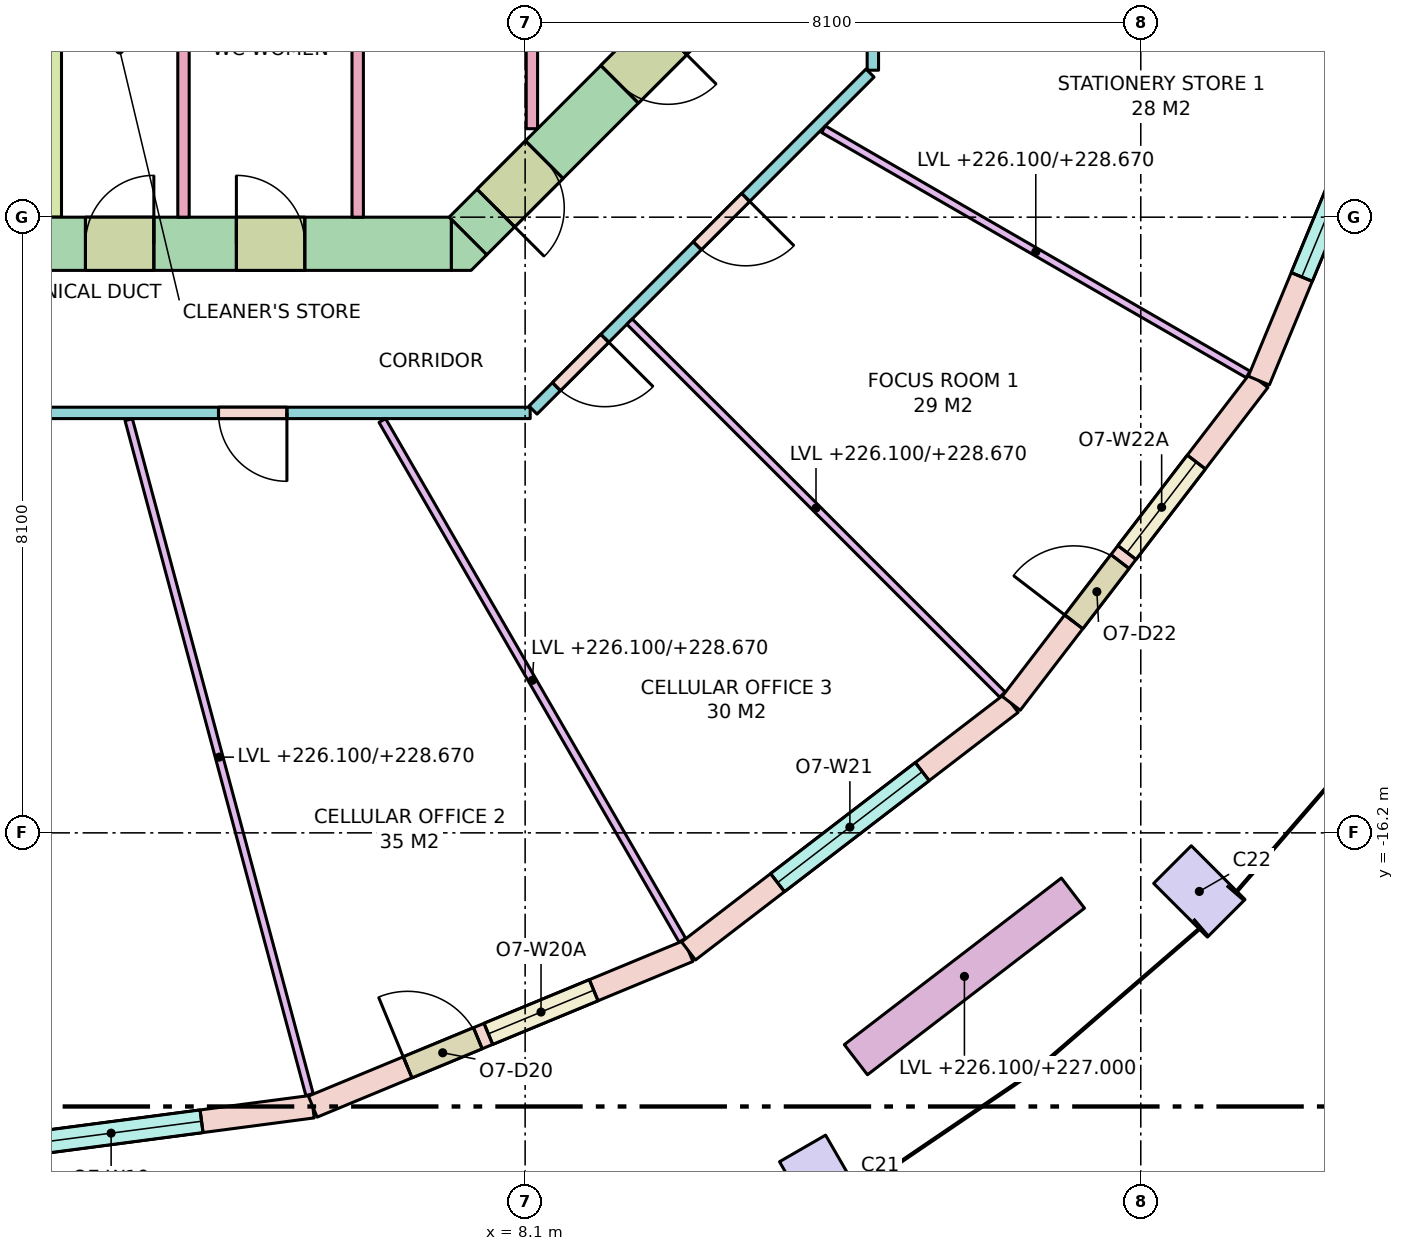
"""IFC4 building model, lengths in metres.
Left out: names, types, materials, properties, quantities, classifications, styles, units other than length and angle.
Written with IfcOpenShell. Run it as: python <this file> out.ifc"""

import sys

from ifc_helpers import new_model, si_unit, direction, frame, frame_2d, origin, origin_2d, place, context, subcontext, project, spatial, polyline, rectangle, outline, extrude, element, fill, save


model = new_model("IFC4")
c1 = context("Model", 3, precision=1e-05, world=origin(), true_north=direction((0.0, 1.0)))
c2 = subcontext(c1, "Body", "Model", "MODEL_VIEW")
j1 = project(units=[si_unit("LENGTHUNIT", "METRE"), si_unit("PLANEANGLEUNIT", "RADIAN")], contexts=[c1])
p1 = place(None, origin())
s1 = spatial("IfcSite", under=j1, at=p1, CompositionType="ELEMENT")
p2 = place(p1, origin())
s2 = spatial("IfcBuilding", under=s1, at=p2, CompositionType="ELEMENT")
p3 = place(p2, frame((0.0, 0.0, 226.1)))
s3 = spatial("IfcBuildingStorey", under=s2, at=p3, CompositionType="ELEMENT", Elevation=226.1)
for number, where, z_axis, x_axis in (
    (1, (12.0, -20.785, 0.0), (0.0, 0.0, 1.0), (0.866, 0.5, 0.0)),
    (2, (16.97, -16.97, 0.0), (0.0, 0.0, 1.0), (0.707, 0.707, 0.0)),
):
    element("IfcColumn", number, at=place(p3, frame(where, z_axis=z_axis, x_axis=x_axis)), inside=s3, PredefinedType="COLUMN", context=c2, shape_type="SweptSolid", body=[
        extrude(rectangle(XDim=0.7, YDim=1.0, at=origin_2d()), origin(), (0.0, 0.0, 1.0), 3.7),
    ])
p4 = place(p3, frame((-7.13, -8.45, -0.28), z_axis=(0.0, 0.0, 1.0), x_axis=(1.0, 0.0, 0.0)))
e3 = element("IfcWall", 3, at=p4, inside=s3, PredefinedType="SHEAR", context=c2, shape_type="SweptSolid", body=[
    extrude(rectangle(XDim=14.26, YDim=0.7, at=frame_2d((7.13, 0.0))), origin(), (0.0, 0.0, 1.0), 3.7),
])
p5 = place(p4, frame((8.08, 0.0, 0.28)))
e4 = element("IfcOpeningElement", 4, at=p5, cuts=e3, PredefinedType="OPENING", context=c2, shape_type="SweptSolid", body=[
    extrude(rectangle(XDim=0.7, YDim=2.1, at=frame_2d((0.35, 1.05))), frame((0.0, 0.36, 0.0), z_axis=(0.0, -1.0, 0.0), x_axis=(1.0, 0.0, 0.0)), (0.0, 0.0, 1.0), 0.72),
])
p6 = place(p4, frame((5.58, 0.0, 0.28)))
e5 = element("IfcOpeningElement", 5, at=p6, cuts=e3, PredefinedType="OPENING", context=c2, shape_type="SweptSolid", body=[
    extrude(rectangle(XDim=0.85, YDim=2.1, at=frame_2d((0.425, 1.05))), frame((0.0, 0.36, 0.0), z_axis=(0.0, -1.0, 0.0), x_axis=(1.0, 0.0, 0.0)), (0.0, 0.0, 1.0), 0.72),
])
p7 = place(p4, frame((6.88, 0.0, 0.28)))
e6 = element("IfcOpeningElement", 6, at=p7, cuts=e3, PredefinedType="OPENING", context=c2, shape_type="SweptSolid", body=[
    extrude(rectangle(XDim=0.85, YDim=2.1, at=frame_2d((0.425, 1.05))), frame((0.0, 0.36, 0.0), z_axis=(0.0, -1.0, 0.0), x_axis=(1.0, 0.0, 0.0)), (0.0, 0.0, 1.0), 0.72),
])
p8 = place(p4, frame((9.445, 0.0, 0.28)))
e7 = element("IfcOpeningElement", 7, at=p8, cuts=e3, PredefinedType="OPENING", context=c2, shape_type="SweptSolid", body=[
    extrude(rectangle(XDim=0.9, YDim=2.1, at=frame_2d((0.45, 1.05))), frame((0.0, 0.36, 0.0), z_axis=(0.0, -1.0, 0.0), x_axis=(1.0, 0.0, 0.0)), (0.0, 0.0, 1.0), 0.72),
])
p9 = place(p4, frame((11.431, 0.0, 0.28)))
e8 = element("IfcOpeningElement", 8, at=p9, cuts=e3, PredefinedType="OPENING", context=c2, shape_type="SweptSolid", body=[
    extrude(rectangle(XDim=0.9, YDim=2.1, at=frame_2d((0.45, 1.05))), frame((0.0, 0.36, 0.0), z_axis=(0.0, -1.0, 0.0), x_axis=(1.0, 0.0, 0.0)), (0.0, 0.0, 1.0), 0.72),
])
p10 = place(p3, frame((10.347, -5.347, -0.28), z_axis=(0.0, 0.0, 1.0), x_axis=(-0.707106781187, -0.707106781187, 0.0)))
e9 = element("IfcWall", 9, at=p10, inside=s3, PredefinedType="SHEAR", context=c2, shape_type="SweptSolid", body=[
    extrude(rectangle(XDim=4.243, YDim=0.7, at=frame_2d((2.121, 0.0))), origin(), (0.0, 0.0, 1.0), 3.7),
])
p11 = place(p10, frame((2.823, 0.0, 0.28)))
e10 = element("IfcOpeningElement", 10, at=p11, cuts=e9, PredefinedType="OPENING", context=c2, shape_type="SweptSolid", body=[
    extrude(rectangle(XDim=0.9, YDim=2.1, at=frame_2d((0.45, 1.05))), frame((0.0, 0.36, 0.0), z_axis=(0.0, -1.0, 0.0), x_axis=(1.0, 0.0, 0.0)), (0.0, 0.0, 1.0), 0.72),
])
p12 = place(p10, frame((0.52, 0.0, 0.28)))
e11 = element("IfcOpeningElement", 11, at=p12, cuts=e9, PredefinedType="OPENING", context=c2, shape_type="SweptSolid", body=[
    extrude(rectangle(XDim=0.9, YDim=2.1, at=frame_2d((0.45, 1.05))), frame((0.0, 0.36, 0.0), z_axis=(0.0, -1.0, 0.0), x_axis=(1.0, 0.0, 0.0)), (0.0, 0.0, 1.0), 0.72),
])
p13 = place(p3, frame((0.0, 0.0, -0.28)))
e12 = element("IfcWall", 12, at=p13, inside=s3, PredefinedType="SHEAR", context=c2, shape_type="SweptSolid", body=[
    extrude(outline(polyline([(7.39, -8.8), (7.13, -8.8), (7.13, -8.8), (7.13, -8.13), (7.595, -8.595), (7.595, -8.595), (7.595, -8.595), (7.39, -8.8)])), origin(), (0.0, 0.0, 1.0), 3.7),
])
p14 = place(p3, frame((1.85, -8.1, 0.0), z_axis=(0.0, 0.0, 1.0), x_axis=(0.0, 1.0, 0.0)))
e13 = element("IfcWall", 13, at=p14, inside=s3, PredefinedType="SHEAR", context=c2, shape_type="SweptSolid", body=[
    extrude(rectangle(XDim=6.6, YDim=0.3, at=frame_2d((3.3, 0.0))), origin(), (0.0, 0.0, 1.0), 3.42),
])
p15 = place(p3, frame((0.0, -20.5, 0.0), z_axis=(0.0, 0.0, 1.0), x_axis=(0.991446064069, 0.130517056518, 0.0)))
e14 = element("IfcWall", 14, at=p15, inside=s3, PredefinedType="STANDARD", context=c2, shape_type="SweptSolid", body=[
    extrude(rectangle(XDim=5.352, YDim=0.3, at=frame_2d((2.676, 0.0))), origin(), (0.0, 0.0, 1.0), 3.42),
])
p16 = place(p15, frame((1.476, 0.0, 0.8)))
e15 = element("IfcOpeningElement", 15, at=p16, cuts=e14, PredefinedType="OPENING", context=c2, shape_type="SweptSolid", body=[
    extrude(rectangle(XDim=2.4, YDim=2.4, at=frame_2d((1.2, 1.2))), frame((0.0, 0.16, 0.0), z_axis=(0.0, -1.0, 0.0), x_axis=(1.0, 0.0, 0.0)), (0.0, 0.0, 1.0), 0.32),
])
p17 = place(p3, frame((5.306, -19.802, 0.0), z_axis=(0.0, 0.0, 1.0), x_axis=(0.923867255172, 0.382713071139, 0.0)))
e16 = element("IfcWall", 16, at=p17, inside=s3, PredefinedType="STANDARD", context=c2, shape_type="SweptSolid", body=[
    extrude(rectangle(XDim=5.352, YDim=0.3, at=frame_2d((2.676, 0.0))), origin(), (0.0, 0.0, 1.0), 3.42),
])
p18 = place(p17, frame((1.351, 0.0, 0.0)))
e17 = element("IfcOpeningElement", 17, at=p18, cuts=e16, PredefinedType="OPENING", context=c2, shape_type="SweptSolid", body=[
    extrude(rectangle(XDim=1.0, YDim=2.4, at=frame_2d((0.5, 1.2))), frame((0.0, 0.16, 0.0), z_axis=(0.0, -1.0, 0.0), x_axis=(1.0, 0.0, 0.0)), (0.0, 0.0, 1.0), 0.32),
])
p19 = place(p17, frame((2.501, 0.0, 0.8)))
e18 = element("IfcOpeningElement", 18, at=p19, cuts=e16, PredefinedType="OPENING", context=c2, shape_type="SweptSolid", body=[
    extrude(rectangle(XDim=1.5, YDim=2.4, at=frame_2d((0.75, 1.2))), frame((0.0, 0.16, 0.0), z_axis=(0.0, -1.0, 0.0), x_axis=(1.0, 0.0, 0.0)), (0.0, 0.0, 1.0), 0.32),
])
p20 = place(p3, frame((10.25, -17.753, 0.0), z_axis=(0.0, 0.0, 1.0), x_axis=(0.793349293227, 0.60876670321, 0.0)))
e19 = element("IfcWall", 19, at=p20, inside=s3, PredefinedType="STANDARD", context=c2, shape_type="SweptSolid", body=[
    extrude(rectangle(XDim=5.352, YDim=0.3, at=frame_2d((2.676, 0.0))), origin(), (0.0, 0.0, 1.0), 3.42),
])
p21 = place(p20, frame((1.476, 0.0, 0.8)))
e20 = element("IfcOpeningElement", 20, at=p21, cuts=e19, PredefinedType="OPENING", context=c2, shape_type="SweptSolid", body=[
    extrude(rectangle(XDim=2.4, YDim=2.4, at=frame_2d((1.2, 1.2))), frame((0.0, 0.16, 0.0), z_axis=(0.0, -1.0, 0.0), x_axis=(1.0, 0.0, 0.0)), (0.0, 0.0, 1.0), 0.32),
])
p22 = place(p3, frame((14.496, -14.496, 0.0), z_axis=(0.0, 0.0, 1.0), x_axis=(0.60876670321, 0.793349293227, 0.0)))
e21 = element("IfcWall", 21, at=p22, inside=s3, PredefinedType="STANDARD", context=c2, shape_type="SweptSolid", body=[
    extrude(rectangle(XDim=5.352, YDim=0.3, at=frame_2d((2.676, 0.0))), origin(), (0.0, 0.0, 1.0), 3.42),
])
p23 = place(p22, frame((1.351, 0.0, 0.0)))
e22 = element("IfcOpeningElement", 22, at=p23, cuts=e21, PredefinedType="OPENING", context=c2, shape_type="SweptSolid", body=[
    extrude(rectangle(XDim=1.0, YDim=2.4, at=frame_2d((0.5, 1.2))), frame((0.0, 0.16, 0.0), z_axis=(0.0, -1.0, 0.0), x_axis=(1.0, 0.0, 0.0)), (0.0, 0.0, 1.0), 0.32),
])
p24 = place(p22, frame((2.501, 0.0, 0.8)))
e23 = element("IfcOpeningElement", 23, at=p24, cuts=e21, PredefinedType="OPENING", context=c2, shape_type="SweptSolid", body=[
    extrude(rectangle(XDim=1.5, YDim=2.4, at=frame_2d((0.75, 1.2))), frame((0.0, 0.16, 0.0), z_axis=(0.0, -1.0, 0.0), x_axis=(1.0, 0.0, 0.0)), (0.0, 0.0, 1.0), 0.32),
])
p25 = place(p3, frame((17.753, -10.25, 0.0), z_axis=(0.0, 0.0, 1.0), x_axis=(0.382713071139, 0.923867255172, 0.0)))
e24 = element("IfcWall", 24, at=p25, inside=s3, PredefinedType="STANDARD", context=c2, shape_type="SweptSolid", body=[
    extrude(rectangle(XDim=5.352, YDim=0.3, at=frame_2d((2.676, 0.0))), origin(), (0.0, 0.0, 1.0), 3.42),
])
p26 = place(p25, frame((1.476, 0.0, 0.8)))
e25 = element("IfcOpeningElement", 25, at=p26, cuts=e24, PredefinedType="OPENING", context=c2, shape_type="SweptSolid", body=[
    extrude(rectangle(XDim=2.4, YDim=2.4, at=frame_2d((1.2, 1.2))), frame((0.0, 0.16, 0.0), z_axis=(0.0, -1.0, 0.0), x_axis=(1.0, 0.0, 0.0)), (0.0, 0.0, 1.0), 0.32),
])
p27 = place(p3, frame((12.452, -19.184, 0.0), z_axis=(0.0, 0.0, 1.0), x_axis=(0.793384730612, 0.608720518162, 0.0)))
e26 = element("IfcWall", 26, at=p27, inside=s3, PredefinedType="PARAPET", context=c2, shape_type="SweptSolid", body=[
    extrude(rectangle(XDim=3.6, YDim=0.5, at=frame_2d((1.8, 0.0))), origin(), (0.0, 0.0, 1.0), 0.9),
])
for number, where, z_axis, x_axis in (
    (27, (3.605, -8.1, 0.0), (0.0, 0.0, 1.0), (0.0, 1.0, 0.0)),
    (28, (5.897, -8.1, 0.0), (0.0, 0.0, 1.0), (0.0, 1.0, 0.0)),
):
    element("IfcWall", number, at=place(p3, frame(where, z_axis=z_axis, x_axis=x_axis)), inside=s3, PredefinedType="PARTITIONING", context=c2, shape_type="SweptSolid", body=[
        extrude(rectangle(XDim=3.6, YDim=0.15, at=frame_2d((1.8, 0.0))), origin(), (0.0, 0.0, 1.0), 3.42),
    ])
p28 = place(p3, frame((8.189, -6.936, 0.0), z_axis=(0.0, 0.0, 1.0), x_axis=(0.0, 1.0, 0.0)))
e29 = element("IfcWall", 29, at=p28, inside=s3, PredefinedType="PARTITIONING", context=c2, shape_type="SweptSolid", body=[
    extrude(rectangle(XDim=2.436, YDim=0.15, at=frame_2d((1.218, 0.0))), origin(), (0.0, 0.0, 1.0), 3.42),
])
p29 = place(p3, frame((12.638, -6.204, 0.0), z_axis=(0.0, 0.0, 1.0), x_axis=(-0.707106781187, -0.707106781187, 0.0)))
e30 = element("IfcWall", 30, at=p29, inside=s3, PredefinedType="PARTITIONING", context=c2, shape_type="SweptSolid", body=[
    extrude(rectangle(XDim=6.271, YDim=0.15, at=frame_2d((3.135, 0.0))), origin(), (0.0, 0.0, 1.0), 2.57),
])
p30 = place(p29, frame((4.935, 0.0, 0.0)))
e31 = element("IfcOpeningElement", 31, at=p30, cuts=e30, PredefinedType="OPENING", context=c2, shape_type="SweptSolid", body=[
    extrude(rectangle(XDim=0.9, YDim=2.1, at=frame_2d((0.45, 1.05))), frame((0.0, 0.085, 0.0), z_axis=(0.0, -1.0, 0.0), x_axis=(1.0, 0.0, 0.0)), (0.0, 0.0, 1.0), 0.17),
])
p31 = place(p29, frame((2.314, 0.0, 0.0)))
e32 = element("IfcOpeningElement", 32, at=p31, cuts=e30, PredefinedType="OPENING", context=c2, shape_type="SweptSolid", body=[
    extrude(rectangle(XDim=0.9, YDim=2.1, at=frame_2d((0.45, 1.05))), frame((0.0, 0.085, 0.0), z_axis=(0.0, -1.0, 0.0), x_axis=(1.0, 0.0, 0.0)), (0.0, 0.0, 1.0), 0.17),
])
p32 = place(p3, frame((8.167, -10.675, 0.0), z_axis=(0.0, 0.0, 1.0), x_axis=(-1.0, 0.0, 0.0)))
e33 = element("IfcWall", 33, at=p32, inside=s3, PredefinedType="PARTITIONING", context=c2, shape_type="SweptSolid", body=[
    extrude(rectangle(XDim=16.333, YDim=0.15, at=frame_2d((8.167, 0.0))), origin(), (0.0, 0.0, 1.0), 2.57),
])
p33 = place(p32, frame((9.894, 0.0, 0.0)))
e34 = element("IfcOpeningElement", 34, at=p33, cuts=e33, PredefinedType="OPENING", context=c2, shape_type="SweptSolid", body=[
    extrude(rectangle(XDim=1.8, YDim=2.1, at=frame_2d((0.9, 1.05))), frame((0.0, 0.085, 0.0), z_axis=(0.0, -1.0, 0.0), x_axis=(1.0, 0.0, 0.0)), (0.0, 0.0, 1.0), 0.17),
])
p34 = place(p32, frame((3.201, 0.0, 0.0)))
e35 = element("IfcOpeningElement", 35, at=p34, cuts=e33, PredefinedType="OPENING", context=c2, shape_type="SweptSolid", body=[
    extrude(rectangle(XDim=0.9, YDim=2.1, at=frame_2d((0.45, 1.05))), frame((0.0, 0.085, 0.0), z_axis=(0.0, -1.0, 0.0), x_axis=(1.0, 0.0, 0.0)), (0.0, 0.0, 1.0), 0.17),
])
p35 = place(p3, frame((12.675, 6.167, 0.0), z_axis=(0.0, 0.0, 1.0), x_axis=(0.0, -1.0, 0.0)))
e36 = element("IfcWall", 36, at=p35, inside=s3, PredefinedType="PARTITIONING", context=c2, shape_type="SweptSolid", body=[
    extrude(rectangle(XDim=12.333, YDim=0.15, at=frame_2d((6.167, 0.0))), origin(), (0.0, 0.0, 1.0), 2.57),
])
p36 = place(p35, frame((10.473, 0.0, 0.0)))
e37 = element("IfcOpeningElement", 37, at=p36, cuts=e36, PredefinedType="OPENING", context=c2, shape_type="SweptSolid", body=[
    extrude(rectangle(XDim=0.9, YDim=2.1, at=frame_2d((0.45, 1.05))), frame((0.0, 0.085, 0.0), z_axis=(0.0, -1.0, 0.0), x_axis=(1.0, 0.0, 0.0)), (0.0, 0.0, 1.0), 0.17),
])
p37 = place(p35, frame((7.416, 0.0, 0.0)))
e38 = element("IfcOpeningElement", 38, at=p37, cuts=e36, PredefinedType="OPENING", context=c2, shape_type="SweptSolid", body=[
    extrude(rectangle(XDim=0.9, YDim=2.1, at=frame_2d((0.45, 1.05))), frame((0.0, 0.085, 0.0), z_axis=(0.0, -1.0, 0.0), x_axis=(1.0, 0.0, 0.0)), (0.0, 0.0, 1.0), 0.17),
])
p38 = place(p35, frame((2.208, 0.0, 0.0)))
e39 = element("IfcOpeningElement", 39, at=p38, cuts=e36, PredefinedType="OPENING", context=c2, shape_type="SweptSolid", body=[
    extrude(rectangle(XDim=1.8, YDim=2.1, at=frame_2d((0.9, 1.05))), frame((0.0, 0.085, 0.0), z_axis=(0.0, -1.0, 0.0), x_axis=(1.0, 0.0, 0.0)), (0.0, 0.0, 1.0), 0.17),
])
p39 = place(p3, frame((2.884, -10.764, 0.0), z_axis=(0.0, 0.0, 1.0), x_axis=(0.258811310764, -0.965927898666, 0.0)))
e40 = element("IfcWall", 40, at=p39, inside=s3, PredefinedType="PARTITIONING", context=c2, shape_type="SweptSolid", body=[
    extrude(rectangle(XDim=9.193, YDim=0.1, at=frame_2d((4.596, 0.0))), origin(), (0.0, 0.0, 1.0), 2.57),
])
p40 = place(p3, frame((6.221, -10.775, 0.0), z_axis=(0.0, 0.0, 1.0), x_axis=(0.500016891966, -0.866015650984, 0.0)))
e41 = element("IfcWall", 41, at=p40, inside=s3, PredefinedType="PARTITIONING", context=c2, shape_type="SweptSolid", body=[
    extrude(rectangle(XDim=7.895, YDim=0.1, at=frame_2d((3.948, 0.0))), origin(), (0.0, 0.0, 1.0), 2.57),
])
p41 = place(p3, frame((9.474, -9.474, 0.0), z_axis=(0.0, 0.0, 1.0), x_axis=(0.707106781187, -0.707106781187, 0.0)))
e42 = element("IfcWall", 42, at=p41, inside=s3, PredefinedType="PARTITIONING", context=c2, shape_type="SweptSolid", body=[
    extrude(rectangle(XDim=6.938, YDim=0.1, at=frame_2d((3.469, 0.0))), origin(), (0.0, 0.0, 1.0), 2.57),
])
p42 = place(p3, frame((12.025, -6.943, 0.0), z_axis=(0.0, 0.0, 1.0), x_axis=(0.866026773083, -0.499997628298, 0.0)))
e43 = element("IfcWall", 43, at=p42, inside=s3, PredefinedType="PARTITIONING", context=c2, shape_type="SweptSolid", body=[
    extrude(rectangle(XDim=6.451, YDim=0.1, at=frame_2d((3.226, 0.0))), origin(), (0.0, 0.0, 1.0), 2.57),
])
p43 = place(p16, origin())
e44 = element("IfcWindow", 44, at=p43, inside=s3, PartitioningType="SINGLE_PANEL", PredefinedType="WINDOW", context=c2, shape_type="SweptSolid", body=[
    extrude(rectangle(XDim=2.4, YDim=2.4, at=frame_2d((1.2, 1.2))), frame((0.0, 0.03, 0.0), z_axis=(0.0, -1.0, 0.0), x_axis=(1.0, 0.0, 0.0)), (0.0, 0.0, 1.0), 0.06),
])
fill(e15, e44)
p44 = place(p18, origin())
e45 = element("IfcDoor", 45, at=p44, inside=s3, OperationType="SINGLE_SWING_LEFT", PredefinedType="DOOR", context=c2, shape_type="SweptSolid", body=[
    extrude(rectangle(XDim=1.0, YDim=2.4, at=frame_2d((0.5, 1.2))), frame((0.0, 0.025, 0.0), z_axis=(0.0, -1.0, 0.0), x_axis=(1.0, 0.0, 0.0)), (0.0, 0.0, 1.0), 0.05),
])
fill(e17, e45)
p45 = place(p19, origin())
e46 = element("IfcWindow", 46, at=p45, inside=s3, PartitioningType="SINGLE_PANEL", PredefinedType="WINDOW", context=c2, shape_type="SweptSolid", body=[
    extrude(rectangle(XDim=1.5, YDim=2.4, at=frame_2d((0.75, 1.2))), frame((0.0, 0.03, 0.0), z_axis=(0.0, -1.0, 0.0), x_axis=(1.0, 0.0, 0.0)), (0.0, 0.0, 1.0), 0.06),
])
fill(e18, e46)
p46 = place(p21, origin())
e47 = element("IfcWindow", 47, at=p46, inside=s3, PartitioningType="SINGLE_PANEL", PredefinedType="WINDOW", context=c2, shape_type="SweptSolid", body=[
    extrude(rectangle(XDim=2.4, YDim=2.4, at=frame_2d((1.2, 1.2))), frame((0.0, 0.03, 0.0), z_axis=(0.0, -1.0, 0.0), x_axis=(1.0, 0.0, 0.0)), (0.0, 0.0, 1.0), 0.06),
])
fill(e20, e47)
p47 = place(p23, origin())
e48 = element("IfcDoor", 48, at=p47, inside=s3, OperationType="SINGLE_SWING_LEFT", PredefinedType="DOOR", context=c2, shape_type="SweptSolid", body=[
    extrude(rectangle(XDim=1.0, YDim=2.4, at=frame_2d((0.5, 1.2))), frame((0.0, 0.025, 0.0), z_axis=(0.0, -1.0, 0.0), x_axis=(1.0, 0.0, 0.0)), (0.0, 0.0, 1.0), 0.05),
])
fill(e22, e48)
p48 = place(p24, origin())
e49 = element("IfcWindow", 49, at=p48, inside=s3, PartitioningType="SINGLE_PANEL", PredefinedType="WINDOW", context=c2, shape_type="SweptSolid", body=[
    extrude(rectangle(XDim=1.5, YDim=2.4, at=frame_2d((0.75, 1.2))), frame((0.0, 0.03, 0.0), z_axis=(0.0, -1.0, 0.0), x_axis=(1.0, 0.0, 0.0)), (0.0, 0.0, 1.0), 0.06),
])
fill(e23, e49)
p49 = place(p26, origin())
e50 = element("IfcWindow", 50, at=p49, inside=s3, PartitioningType="SINGLE_PANEL", PredefinedType="WINDOW", context=c2, shape_type="SweptSolid", body=[
    extrude(rectangle(XDim=2.4, YDim=2.4, at=frame_2d((1.2, 1.2))), frame((0.0, 0.03, 0.0), z_axis=(0.0, -1.0, 0.0), x_axis=(1.0, 0.0, 0.0)), (0.0, 0.0, 1.0), 0.06),
])
fill(e25, e50)
p50 = place(p8, origin())
e51 = element("IfcDoor", 51, at=p50, inside=s3, OperationType="SINGLE_SWING_RIGHT", PredefinedType="DOOR", context=c2, shape_type="SweptSolid", body=[
    extrude(rectangle(XDim=0.9, YDim=2.1, at=frame_2d((0.45, 1.05))), frame((0.0, 0.025, 0.0), z_axis=(0.0, -1.0, 0.0), x_axis=(1.0, 0.0, 0.0)), (0.0, 0.0, 1.0), 0.05),
])
fill(e7, e51)
p51 = place(p9, origin())
e52 = element("IfcDoor", 52, at=p51, inside=s3, OperationType="SINGLE_SWING_LEFT", PredefinedType="DOOR", context=c2, shape_type="SweptSolid", body=[
    extrude(rectangle(XDim=0.9, YDim=2.1, at=frame_2d((0.45, 1.05))), frame((0.0, 0.025, 0.0), z_axis=(0.0, -1.0, 0.0), x_axis=(1.0, 0.0, 0.0)), (0.0, 0.0, 1.0), 0.05),
])
fill(e8, e52)
p52 = place(p11, origin())
e53 = element("IfcDoor", 53, at=p52, inside=s3, OperationType="SINGLE_SWING_RIGHT", PredefinedType="DOOR", context=c2, shape_type="SweptSolid", body=[
    extrude(rectangle(XDim=0.9, YDim=2.1, at=frame_2d((0.45, 1.05))), frame((0.0, 0.025, 0.0), z_axis=(0.0, -1.0, 0.0), x_axis=(1.0, 0.0, 0.0)), (0.0, 0.0, 1.0), 0.05),
])
fill(e10, e53)
p53 = place(p12, origin())
e54 = element("IfcDoor", 54, at=p53, inside=s3, OperationType="SINGLE_SWING_LEFT", PredefinedType="DOOR", context=c2, shape_type="SweptSolid", body=[
    extrude(rectangle(XDim=0.9, YDim=2.1, at=frame_2d((0.45, 1.05))), frame((0.0, 0.025, 0.0), z_axis=(0.0, -1.0, 0.0), x_axis=(1.0, 0.0, 0.0)), (0.0, 0.0, 1.0), 0.05),
])
fill(e11, e54)
p54 = place(p34, origin())
e55 = element("IfcDoor", 55, at=p54, inside=s3, OperationType="SINGLE_SWING_LEFT", PredefinedType="DOOR", context=c2, shape_type="SweptSolid", body=[
    extrude(rectangle(XDim=0.9, YDim=2.1, at=frame_2d((0.45, 1.05))), frame((0.0, 0.025, 0.0), z_axis=(0.0, -1.0, 0.0), x_axis=(1.0, 0.0, 0.0)), (0.0, 0.0, 1.0), 0.05),
])
fill(e35, e55)
p55 = place(p30, origin())
e56 = element("IfcDoor", 56, at=p55, inside=s3, OperationType="SINGLE_SWING_LEFT", PredefinedType="DOOR", context=c2, shape_type="SweptSolid", body=[
    extrude(rectangle(XDim=0.9, YDim=2.1, at=frame_2d((0.45, 1.05))), frame((0.0, 0.025, 0.0), z_axis=(0.0, -1.0, 0.0), x_axis=(1.0, 0.0, 0.0)), (0.0, 0.0, 1.0), 0.05),
])
fill(e31, e56)
p56 = place(p31, origin())
e57 = element("IfcDoor", 57, at=p56, inside=s3, OperationType="SINGLE_SWING_LEFT", PredefinedType="DOOR", context=c2, shape_type="SweptSolid", body=[
    extrude(rectangle(XDim=0.9, YDim=2.1, at=frame_2d((0.45, 1.05))), frame((0.0, 0.025, 0.0), z_axis=(0.0, -1.0, 0.0), x_axis=(1.0, 0.0, 0.0)), (0.0, 0.0, 1.0), 0.05),
])
fill(e32, e57)
save(model, sys.argv[1])
